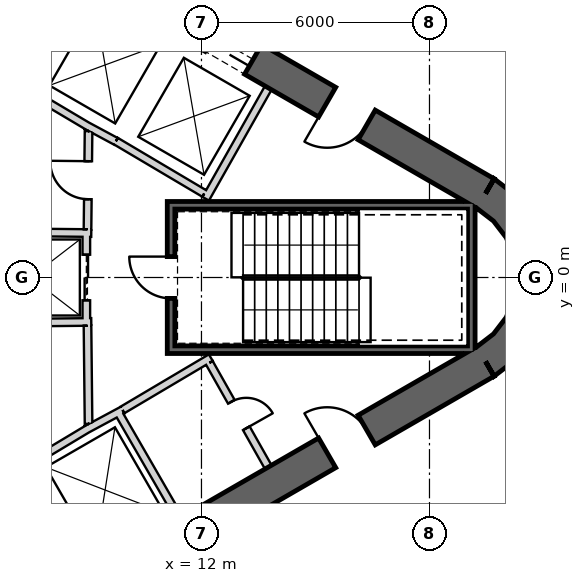
"""IFC4 building model, lengths in metres.
Left out: names, types, materials, properties, quantities, classifications, styles, units other than length and angle.
Written with IfcOpenShell. Run it as: python <this file> out.ifc"""

import sys

from ifc_helpers import new_model, si_unit, direction, frame, frame_2d, origin, place, context, subcontext, project, spatial, polyline, rectangle, outline, extrude, element, fill, save


model = new_model("IFC4")
c1 = context("Model", 3, precision=1e-05, world=origin(), true_north=direction((0.0, 1.0)))
c2 = subcontext(c1, "Body", "Model", "MODEL_VIEW")
j1 = project(units=[si_unit("LENGTHUNIT", "METRE"), si_unit("PLANEANGLEUNIT", "RADIAN")], contexts=[c1])
p1 = place(None, origin())
s1 = spatial("IfcSite", under=j1, at=p1, CompositionType="ELEMENT")
p2 = place(p1, origin())
s2 = spatial("IfcBuilding", under=s1, at=p2, CompositionType="ELEMENT")
p3 = place(p2, frame((0.0, 0.0, 131.6)))
s3 = spatial("IfcBuildingStorey", under=s2, at=p3, CompositionType="ELEMENT", Elevation=131.6)
p4 = place(p3, frame((19.475, 2.208, 0.0), z_axis=(0.0, 0.0, 1.0), x_axis=(-0.866028369851, 0.499994862586, 0.0)))
e1 = element("IfcWall", 1, at=p4, inside=s3, PredefinedType="SHEAR", context=c2, shape_type="SweptSolid", body=[
    extrude(rectangle(XDim=31.523, YDim=0.9, at=frame_2d((15.762, 0.0))), origin(), (0.0, 0.0, 1.0), 4.1),
])
p5 = place(p4, frame((7.062, 0.0, 0.0)))
e2 = element("IfcOpeningElement", 2, at=p5, cuts=e1, PredefinedType="OPENING", context=c2, shape_type="SweptSolid", body=[
    extrude(rectangle(XDim=1.2, YDim=2.4, at=frame_2d((0.6, 1.2))), frame((0.0, 0.46, 0.0), z_axis=(0.0, -1.0, 0.0), x_axis=(1.0, 0.0, 0.0)), (0.0, 0.0, 1.0), 0.92),
])
p6 = place(p4, frame((9.762, 0.0, 0.0)))
e3 = element("IfcOpeningElement", 3, at=p6, cuts=e1, PredefinedType="OPENING", context=c2, shape_type="SweptSolid", body=[
    extrude(rectangle(XDim=1.2, YDim=2.4, at=frame_2d((0.6, 1.2))), frame((0.0, 0.46, 0.0), z_axis=(0.0, -1.0, 0.0), x_axis=(1.0, 0.0, 0.0)), (0.0, 0.0, 1.0), 0.92),
])
p7 = place(p4, frame((12.462, 0.0, 0.0)))
e4 = element("IfcOpeningElement", 4, at=p7, cuts=e1, PredefinedType="OPENING", context=c2, shape_type="SweptSolid", body=[
    extrude(rectangle(XDim=1.2, YDim=2.4, at=frame_2d((0.6, 1.2))), frame((0.0, 0.46, 0.0), z_axis=(0.0, -1.0, 0.0), x_axis=(1.0, 0.0, 0.0)), (0.0, 0.0, 1.0), 0.92),
])
p8 = place(p4, frame((15.162, 0.0, 0.0)))
e5 = element("IfcOpeningElement", 5, at=p8, cuts=e1, PredefinedType="OPENING", context=c2, shape_type="SweptSolid", body=[
    extrude(rectangle(XDim=1.2, YDim=2.4, at=frame_2d((0.6, 1.2))), frame((0.0, 0.46, 0.0), z_axis=(0.0, -1.0, 0.0), x_axis=(1.0, 0.0, 0.0)), (0.0, 0.0, 1.0), 0.92),
])
p9 = place(p4, frame((17.862, 0.0, 0.0)))
e6 = element("IfcOpeningElement", 6, at=p9, cuts=e1, PredefinedType="OPENING", context=c2, shape_type="SweptSolid", body=[
    extrude(rectangle(XDim=1.2, YDim=2.4, at=frame_2d((0.6, 1.2))), frame((0.0, 0.46, 0.0), z_axis=(0.0, -1.0, 0.0), x_axis=(1.0, 0.0, 0.0)), (0.0, 0.0, 1.0), 0.92),
])
p10 = place(p4, frame((20.562, 0.0, 0.0)))
e7 = element("IfcOpeningElement", 7, at=p10, cuts=e1, PredefinedType="OPENING", context=c2, shape_type="SweptSolid", body=[
    extrude(rectangle(XDim=1.2, YDim=2.4, at=frame_2d((0.6, 1.2))), frame((0.0, 0.46, 0.0), z_axis=(0.0, -1.0, 0.0), x_axis=(1.0, 0.0, 0.0)), (0.0, 0.0, 1.0), 0.92),
])
p11 = place(p4, frame((23.262, 0.0, 0.0)))
e8 = element("IfcOpeningElement", 8, at=p11, cuts=e1, PredefinedType="OPENING", context=c2, shape_type="SweptSolid", body=[
    extrude(rectangle(XDim=1.2, YDim=2.4, at=frame_2d((0.6, 1.2))), frame((0.0, 0.46, 0.0), z_axis=(0.0, -1.0, 0.0), x_axis=(1.0, 0.0, 0.0)), (0.0, 0.0, 1.0), 0.92),
])
p12 = place(p4, frame((3.612, 0.0, 0.0)))
e9 = element("IfcOpeningElement", 9, at=p12, cuts=e1, PredefinedType="OPENING", context=c2, shape_type="SweptSolid", body=[
    extrude(rectangle(XDim=1.2, YDim=2.4, at=frame_2d((0.6, 1.2))), frame((0.0, 0.46, 0.0), z_axis=(0.0, -1.0, 0.0), x_axis=(1.0, 0.0, 0.0)), (0.0, 0.0, 1.0), 0.92),
])
p13 = place(p4, frame((26.712, 0.0, 0.0)))
e10 = element("IfcOpeningElement", 10, at=p13, cuts=e1, PredefinedType="OPENING", context=c2, shape_type="SweptSolid", body=[
    extrude(rectangle(XDim=1.2, YDim=2.4, at=frame_2d((0.6, 1.2))), frame((0.0, 0.46, 0.0), z_axis=(0.0, -1.0, 0.0), x_axis=(1.0, 0.0, 0.0)), (0.0, 0.0, 1.0), 0.92),
])
p14 = place(p3, frame((-7.825, -17.97, 0.0), z_axis=(0.0, 0.0, 1.0), x_axis=(0.866028369851, 0.499994862586, 0.0)))
e11 = element("IfcWall", 11, at=p14, inside=s3, PredefinedType="SHEAR", context=c2, shape_type="SweptSolid", body=[
    extrude(rectangle(XDim=31.523, YDim=0.9, at=frame_2d((15.762, 0.0))), origin(), (0.0, 0.0, 1.0), 4.1),
])
p15 = place(p14, frame((7.062, 0.0, 0.0)))
e12 = element("IfcOpeningElement", 12, at=p15, cuts=e11, PredefinedType="OPENING", context=c2, shape_type="SweptSolid", body=[
    extrude(rectangle(XDim=1.2, YDim=2.4, at=frame_2d((0.6, 1.2))), frame((0.0, 0.46, 0.0), z_axis=(0.0, -1.0, 0.0), x_axis=(1.0, 0.0, 0.0)), (0.0, 0.0, 1.0), 0.92),
])
p16 = place(p14, frame((9.762, 0.0, 0.0)))
e13 = element("IfcOpeningElement", 13, at=p16, cuts=e11, PredefinedType="OPENING", context=c2, shape_type="SweptSolid", body=[
    extrude(rectangle(XDim=1.2, YDim=2.4, at=frame_2d((0.6, 1.2))), frame((0.0, 0.46, 0.0), z_axis=(0.0, -1.0, 0.0), x_axis=(1.0, 0.0, 0.0)), (0.0, 0.0, 1.0), 0.92),
])
p17 = place(p14, frame((12.462, 0.0, 0.0)))
e14 = element("IfcOpeningElement", 14, at=p17, cuts=e11, PredefinedType="OPENING", context=c2, shape_type="SweptSolid", body=[
    extrude(rectangle(XDim=1.2, YDim=2.4, at=frame_2d((0.6, 1.2))), frame((0.0, 0.46, 0.0), z_axis=(0.0, -1.0, 0.0), x_axis=(1.0, 0.0, 0.0)), (0.0, 0.0, 1.0), 0.92),
])
p18 = place(p14, frame((15.162, 0.0, 0.0)))
e15 = element("IfcOpeningElement", 15, at=p18, cuts=e11, PredefinedType="OPENING", context=c2, shape_type="SweptSolid", body=[
    extrude(rectangle(XDim=1.2, YDim=2.4, at=frame_2d((0.6, 1.2))), frame((0.0, 0.46, 0.0), z_axis=(0.0, -1.0, 0.0), x_axis=(1.0, 0.0, 0.0)), (0.0, 0.0, 1.0), 0.92),
])
p19 = place(p14, frame((17.862, 0.0, 0.0)))
e16 = element("IfcOpeningElement", 16, at=p19, cuts=e11, PredefinedType="OPENING", context=c2, shape_type="SweptSolid", body=[
    extrude(rectangle(XDim=1.2, YDim=2.4, at=frame_2d((0.6, 1.2))), frame((0.0, 0.46, 0.0), z_axis=(0.0, -1.0, 0.0), x_axis=(1.0, 0.0, 0.0)), (0.0, 0.0, 1.0), 0.92),
])
p20 = place(p14, frame((20.562, 0.0, 0.0)))
e17 = element("IfcOpeningElement", 17, at=p20, cuts=e11, PredefinedType="OPENING", context=c2, shape_type="SweptSolid", body=[
    extrude(rectangle(XDim=1.2, YDim=2.4, at=frame_2d((0.6, 1.2))), frame((0.0, 0.46, 0.0), z_axis=(0.0, -1.0, 0.0), x_axis=(1.0, 0.0, 0.0)), (0.0, 0.0, 1.0), 0.92),
])
p21 = place(p14, frame((26.712, 0.0, 0.0)))
e18 = element("IfcOpeningElement", 18, at=p21, cuts=e11, PredefinedType="OPENING", context=c2, shape_type="SweptSolid", body=[
    extrude(rectangle(XDim=1.2, YDim=2.4, at=frame_2d((0.6, 1.2))), frame((0.0, 0.46, 0.0), z_axis=(0.0, -1.0, 0.0), x_axis=(1.0, 0.0, 0.0)), (0.0, 0.0, 1.0), 0.92),
])
p22 = place(p14, frame((3.612, 0.0, 0.0)))
e19 = element("IfcOpeningElement", 19, at=p22, cuts=e11, PredefinedType="OPENING", context=c2, shape_type="SweptSolid", body=[
    extrude(rectangle(XDim=1.2, YDim=2.4, at=frame_2d((0.6, 1.2))), frame((0.0, 0.46, 0.0), z_axis=(0.0, -1.0, 0.0), x_axis=(1.0, 0.0, 0.0)), (0.0, 0.0, 1.0), 0.92),
])
p23 = place(p3, origin())
e20 = element("IfcWall", 20, at=p23, inside=s3, PredefinedType="SHEAR", context=c2, shape_type="SweptSolid", body=[
    extrude(outline(polyline([(19.7, -2.598), (20.321, -2.121), (20.798, -1.5), (21.098, -0.777), (21.2, 0.0), (21.098, 0.777), (20.798, 1.5), (20.321, 2.121), (19.7, 2.598), (19.25, 1.819), (19.685, 1.485), (20.019, 1.05), (20.229, 0.543), (20.3, 0.0), (20.229, -0.543), (20.019, -1.05), (19.685, -1.485), (19.25, -1.819), (19.7, -2.598)])), origin(), (0.0, 0.0, 1.0), 4.1),
])
p24 = place(p3, frame((12.11, 2.073, 0.0), z_axis=(0.0, 0.0, 1.0), x_axis=(0.49196600604, 0.870614408852, 0.0)))
e21 = element("IfcWall", 21, at=p24, inside=s3, PredefinedType="PLUMBINGWALL", context=c2, shape_type="SweptSolid", body=[
    extrude(rectangle(XDim=3.35, YDim=0.2, at=frame_2d((1.675, 0.0))), origin(), (0.0, 0.0, 1.0), 3.8),
])
p25 = place(p3, frame((12.073, 2.211, 0.0), z_axis=(0.0, 0.0, 1.0), x_axis=(-0.860438357912, 0.509554542943, 0.0)))
e22 = element("IfcWall", 22, at=p25, inside=s3, PredefinedType="PLUMBINGWALL", context=c2, shape_type="SweptSolid", body=[
    extrude(rectangle(XDim=2.7, YDim=0.2, at=frame_2d((1.35, 0.0))), origin(), (0.0, 0.0, 1.0), 3.8),
])
p26 = place(p3, frame((9.748, 3.583, 0.0), z_axis=(0.0, 0.0, 1.0), x_axis=(-0.880917147855, 0.473270513147, 0.0)))
e23 = element("IfcWall", 23, at=p26, inside=s3, PredefinedType="PLUMBINGWALL", context=c2, shape_type="SweptSolid", body=[
    extrude(rectangle(XDim=0.878, YDim=0.2, at=frame_2d((0.439, 0.0))), origin(), (0.0, 0.0, 1.0), 3.8),
])
p27 = place(p3, frame((9.08, 3.937, 0.0), z_axis=(0.0, 0.0, 1.0), x_axis=(-0.859981807212, 0.510324691999, 0.0)))
e24 = element("IfcWall", 24, at=p27, inside=s3, PredefinedType="PLUMBINGWALL", context=c2, shape_type="SweptSolid", body=[
    extrude(rectangle(XDim=1.845, YDim=0.2, at=frame_2d((0.922, 0.0))), origin(), (0.0, 0.0, 1.0), 3.8),
])
p28 = place(p3, frame((9.795, -3.525, 0.0), z_axis=(0.0, 0.0, 1.0), x_axis=(0.499984717929, -0.866034226713, 0.0)))
e25 = element("IfcWall", 25, at=p28, inside=s3, PredefinedType="PLUMBINGWALL", context=c2, shape_type="SweptSolid", body=[
    extrude(rectangle(XDim=3.25, YDim=0.2, at=frame_2d((1.625, 0.0))), origin(), (0.0, 0.0, 1.0), 3.8),
])
p29 = place(p3, frame((8.974, -3.999, 0.0), z_axis=(0.0, 0.0, 1.0), x_axis=(0.880907015104, 0.473289373154, 0.0)))
e26 = element("IfcWall", 26, at=p29, inside=s3, PredefinedType="PLUMBINGWALL", context=c2, shape_type="SweptSolid", body=[
    extrude(rectangle(XDim=1.078, YDim=0.2, at=frame_2d((0.539, 0.0))), origin(), (0.0, 0.0, 1.0), 3.8),
])
p30 = place(p3, frame((7.497, -4.886, 0.0), z_axis=(0.0, 0.0, 1.0), x_axis=(0.857516281273, 0.51445682749, 0.0)))
e27 = element("IfcWall", 27, at=p30, inside=s3, PredefinedType="PLUMBINGWALL", context=c2, shape_type="SweptSolid", body=[
    extrude(rectangle(XDim=1.845, YDim=0.2, at=frame_2d((0.922, 0.0))), origin(), (0.0, 0.0, 1.0), 3.8),
])
p31 = place(p3, frame((19.2, 1.9, -0.3), z_axis=(0.0, 0.0, 1.0), x_axis=(-1.0, 0.0, 0.0)))
e28 = element("IfcWall", 28, at=p31, inside=s3, PredefinedType="SHEAR", context=c2, shape_type="SweptSolid", body=[
    extrude(rectangle(XDim=8.1, YDim=0.2, at=frame_2d((4.05, 0.0))), origin(), (0.0, 0.0, 1.0), 4.1),
])
p32 = place(p3, frame((19.1, -2.0, -0.3), z_axis=(0.0, 0.0, 1.0), x_axis=(0.0, 1.0, 0.0)))
e29 = element("IfcWall", 29, at=p32, inside=s3, PredefinedType="SHEAR", context=c2, shape_type="SweptSolid", body=[
    extrude(rectangle(XDim=3.8, YDim=0.2, at=frame_2d((1.9, 0.0))), origin(), (0.0, 0.0, 1.0), 4.1),
])
p33 = place(p3, frame((11.1, -1.9, -0.3), z_axis=(0.0, 0.0, 1.0), x_axis=(1.0, 0.0, 0.0)))
e30 = element("IfcWall", 30, at=p33, inside=s3, PredefinedType="SHEAR", context=c2, shape_type="SweptSolid", body=[
    extrude(rectangle(XDim=7.9, YDim=0.2, at=frame_2d((3.95, 0.0))), origin(), (0.0, 0.0, 1.0), 4.1),
])
p34 = place(p3, frame((11.2, -1.8, -0.3), z_axis=(0.0, 0.0, 1.0), x_axis=(0.0, 1.0, 0.0)))
e31 = element("IfcWall", 31, at=p34, inside=s3, PredefinedType="SHEAR", context=c2, shape_type="SweptSolid", body=[
    extrude(rectangle(XDim=3.6, YDim=0.2, at=frame_2d((1.8, 0.0))), origin(), (0.0, 0.0, 1.0), 4.1),
])
p35 = place(p34, frame((1.25, 0.0, 0.3)))
e32 = element("IfcOpeningElement", 32, at=p35, cuts=e31, PredefinedType="OPENING", context=c2, shape_type="SweptSolid", body=[
    extrude(rectangle(XDim=1.1, YDim=2.1, at=frame_2d((0.55, 1.05))), frame((0.0, 0.11, 0.0), z_axis=(0.0, -1.0, 0.0), x_axis=(1.0, 0.0, 0.0)), (0.0, 0.0, 1.0), 0.22),
])
p36 = place(p3, frame((8.97, 1.2, 0.0), z_axis=(0.0, 0.0, 1.0), x_axis=(0.0, -1.0, 0.0)))
e33 = element("IfcWall", 33, at=p36, inside=s3, PredefinedType="PLUMBINGWALL", context=c2, shape_type="SweptSolid", body=[
    extrude(rectangle(XDim=2.4, YDim=0.2, at=frame_2d((1.2, 0.0))), origin(), (0.0, 0.0, 1.0), 3.8),
])
p37 = place(p36, frame((0.6, 0.0, 0.0)))
e34 = element("IfcOpeningElement", 34, at=p37, cuts=e33, PredefinedType="OPENING", context=c2, shape_type="SweptSolid", body=[
    extrude(rectangle(XDim=1.2, YDim=2.4, at=frame_2d((0.6, 1.2))), frame((0.0, 0.11, 0.0), z_axis=(0.0, -1.0, 0.0), x_axis=(1.0, 0.0, 0.0)), (0.0, 0.0, 1.0), 0.22),
])
p38 = place(p3, frame((9.1, -1.169, 0.0), z_axis=(0.0, 0.0, 1.0), x_axis=(-0.999949988, -0.010001074852, 0.0)))
e35 = element("IfcWall", 35, at=p38, inside=s3, PredefinedType="PLUMBINGWALL", context=c2, shape_type="SweptSolid", body=[
    extrude(rectangle(XDim=3.1, YDim=0.2, at=frame_2d((1.55, 0.0))), origin(), (0.0, 0.0, 1.0), 3.8),
])
p39 = place(p3, frame((9.1, 1.169, 0.0), z_axis=(0.0, 0.0, 1.0), x_axis=(-0.99994990606, 0.010009264196, 0.0)))
e36 = element("IfcWall", 36, at=p39, inside=s3, PredefinedType="PLUMBINGWALL", context=c2, shape_type="SweptSolid", body=[
    extrude(rectangle(XDim=3.0, YDim=0.2, at=frame_2d((1.5, 0.0))), origin(), (0.0, 0.0, 1.0), 3.8),
])
p40 = place(p3, frame((12.245, -2.109, 0.0), z_axis=(0.0, 0.0, 1.0), x_axis=(-0.860414880418, -0.509594185166, 0.0)))
e37 = element("IfcWall", 37, at=p40, inside=s3, PredefinedType="PARTITIONING", context=c2, shape_type="SweptSolid", body=[
    extrude(rectangle(XDim=2.7, YDim=0.2, at=frame_2d((1.35, 0.0))), origin(), (0.0, 0.0, 1.0), 3.8),
])
p41 = place(p3, frame((13.758, -4.99, 0.0), z_axis=(0.0, 0.0, 1.0), x_axis=(-0.491993409184, 0.87059892334, 0.0)))
e38 = element("IfcWall", 38, at=p41, inside=s3, PredefinedType="PARTITIONING", context=c2, shape_type="SweptSolid", body=[
    extrude(rectangle(XDim=3.15, YDim=0.2, at=frame_2d((1.575, 0.0))), origin(), (0.0, 0.0, 1.0), 3.8),
])
p42 = place(p41, frame((1.175, 0.0, 0.0)))
e39 = element("IfcOpeningElement", 39, at=p42, cuts=e38, PredefinedType="OPENING", context=c2, shape_type="SweptSolid", body=[
    extrude(rectangle(XDim=0.8, YDim=2.1, at=frame_2d((0.4, 1.05))), frame((0.0, 0.11, 0.0), z_axis=(0.0, -1.0, 0.0), x_axis=(1.0, 0.0, 0.0)), (0.0, 0.0, 1.0), 0.22),
])
p43 = place(p3, frame((9.029, -3.851, 0.0), z_axis=(0.0, 0.0, 1.0), x_axis=(-0.010784614026, 0.999941844359, 0.0)))
e40 = element("IfcWall", 40, at=p43, inside=s3, PredefinedType="PARTITIONING", context=c2, shape_type="SweptSolid", body=[
    extrude(rectangle(XDim=2.581, YDim=0.2, at=frame_2d((1.291, 0.0))), origin(), (0.0, 0.0, 1.0), 3.8),
])
p44 = place(p3, frame((9.001, 1.27, 0.0), z_axis=(0.0, 0.0, 1.0), x_axis=(0.010783593937, 0.99994185536, 0.0)))
e41 = element("IfcWall", 41, at=p44, inside=s3, PredefinedType="PARTITIONING", context=c2, shape_type="SweptSolid", body=[
    extrude(rectangle(XDim=2.581, YDim=0.2, at=frame_2d((1.291, 0.0))), origin(), (0.0, 0.0, 1.0), 3.8),
])
p45 = place(p44, frame((0.791, 0.0, 0.0)))
e42 = element("IfcOpeningElement", 42, at=p45, cuts=e41, PredefinedType="OPENING", context=c2, shape_type="SweptSolid", body=[
    extrude(rectangle(XDim=1.0, YDim=2.1, at=frame_2d((0.5, 1.05))), frame((0.0, 0.11, 0.0), z_axis=(0.0, -1.0, 0.0), x_axis=(1.0, 0.0, 0.0)), (0.0, 0.0, 1.0), 0.22),
])
p46 = place(p3, frame((22.336, 5.464, 0.0), z_axis=(0.0, 0.0, 1.0), x_axis=(-0.866027503332, 0.499996363459, 0.0)))
e43 = element("IfcWall", 43, at=p46, inside=s3, PredefinedType="PARTITIONING", context=c2, shape_type="SweptSolid", body=[
    extrude(rectangle(XDim=33.022, YDim=0.2, at=frame_2d((16.511, 0.0))), origin(), (0.0, 0.0, 1.0), 2.98),
])
p47 = place(p46, frame((16.061, 0.0, 0.0)))
e44 = element("IfcOpeningElement", 44, at=p47, cuts=e43, PredefinedType="OPENING", context=c2, shape_type="SweptSolid", body=[
    extrude(rectangle(XDim=1.0, YDim=2.1, at=frame_2d((0.5, 1.05))), frame((0.0, 0.11, 0.0), z_axis=(0.0, -1.0, 0.0), x_axis=(1.0, 0.0, 0.0)), (0.0, 0.0, 1.0), 0.22),
])
p48 = place(p35, origin())
e45 = element("IfcDoor", 45, at=p48, inside=s3, OperationType="SINGLE_SWING_LEFT", PredefinedType="USERDEFINED", context=c2, shape_type="SweptSolid", body=[
    extrude(rectangle(XDim=1.1, YDim=2.1, at=frame_2d((0.55, 1.05))), frame((0.0, 0.025, 0.0), z_axis=(0.0, -1.0, 0.0), x_axis=(1.0, 0.0, 0.0)), (0.0, 0.0, 1.0), 0.05),
])
fill(e32, e45)
p49 = place(p45, origin())
e46 = element("IfcDoor", 46, at=p49, inside=s3, OperationType="SINGLE_SWING_LEFT", PredefinedType="USERDEFINED", context=c2, shape_type="SweptSolid", body=[
    extrude(rectangle(XDim=1.0, YDim=2.1, at=frame_2d((0.5, 1.05))), frame((0.0, 0.025, 0.0), z_axis=(0.0, -1.0, 0.0), x_axis=(1.0, 0.0, 0.0)), (0.0, 0.0, 1.0), 0.05),
])
fill(e42, e46)
p50 = place(p37, origin())
e47 = element("IfcDoor", 47, at=p50, inside=s3, OperationType="SLIDING_TO_LEFT", PredefinedType="USERDEFINED", context=c2, shape_type="SweptSolid", body=[
    extrude(rectangle(XDim=1.2, YDim=2.4, at=frame_2d((0.6, 1.2))), frame((0.0, 0.025, 0.0), z_axis=(0.0, -1.0, 0.0), x_axis=(1.0, 0.0, 0.0)), (0.0, 0.0, 1.0), 0.05),
])
fill(e34, e47)
p51 = place(p42, origin())
e48 = element("IfcDoor", 48, at=p51, inside=s3, OperationType="SINGLE_SWING_LEFT", PredefinedType="USERDEFINED", context=c2, shape_type="SweptSolid", body=[
    extrude(rectangle(XDim=0.8, YDim=2.1, at=frame_2d((0.4, 1.05))), frame((0.0, 0.025, 0.0), z_axis=(0.0, -1.0, 0.0), x_axis=(1.0, 0.0, 0.0)), (0.0, 0.0, 1.0), 0.05),
])
fill(e39, e48)
p52 = place(p5, origin())
e49 = element("IfcDoor", 49, at=p52, inside=s3, OperationType="SLIDING_TO_LEFT", PredefinedType="USERDEFINED", context=c2, shape_type="SweptSolid", body=[
    extrude(rectangle(XDim=1.2, YDim=2.4, at=frame_2d((0.6, 1.2))), frame((0.0, 0.025, 0.0), z_axis=(0.0, -1.0, 0.0), x_axis=(1.0, 0.0, 0.0)), (0.0, 0.0, 1.0), 0.05),
])
fill(e2, e49)
p53 = place(p21, origin())
e50 = element("IfcDoor", 50, at=p53, inside=s3, OperationType="SINGLE_SWING_RIGHT", PredefinedType="USERDEFINED", context=c2, shape_type="SweptSolid", body=[
    extrude(rectangle(XDim=1.2, YDim=2.4, at=frame_2d((0.6, 1.2))), frame((0.0, 0.025, 0.0), z_axis=(0.0, -1.0, 0.0), x_axis=(1.0, 0.0, 0.0)), (0.0, 0.0, 1.0), 0.05),
])
fill(e18, e50)
p54 = place(p12, origin())
e51 = element("IfcDoor", 51, at=p54, inside=s3, OperationType="SINGLE_SWING_RIGHT", PredefinedType="USERDEFINED", context=c2, shape_type="SweptSolid", body=[
    extrude(rectangle(XDim=1.2, YDim=2.4, at=frame_2d((0.6, 1.2))), frame((0.0, 0.025, 0.0), z_axis=(0.0, -1.0, 0.0), x_axis=(1.0, 0.0, 0.0)), (0.0, 0.0, 1.0), 0.05),
])
fill(e9, e51)
save(model, sys.argv[1])
